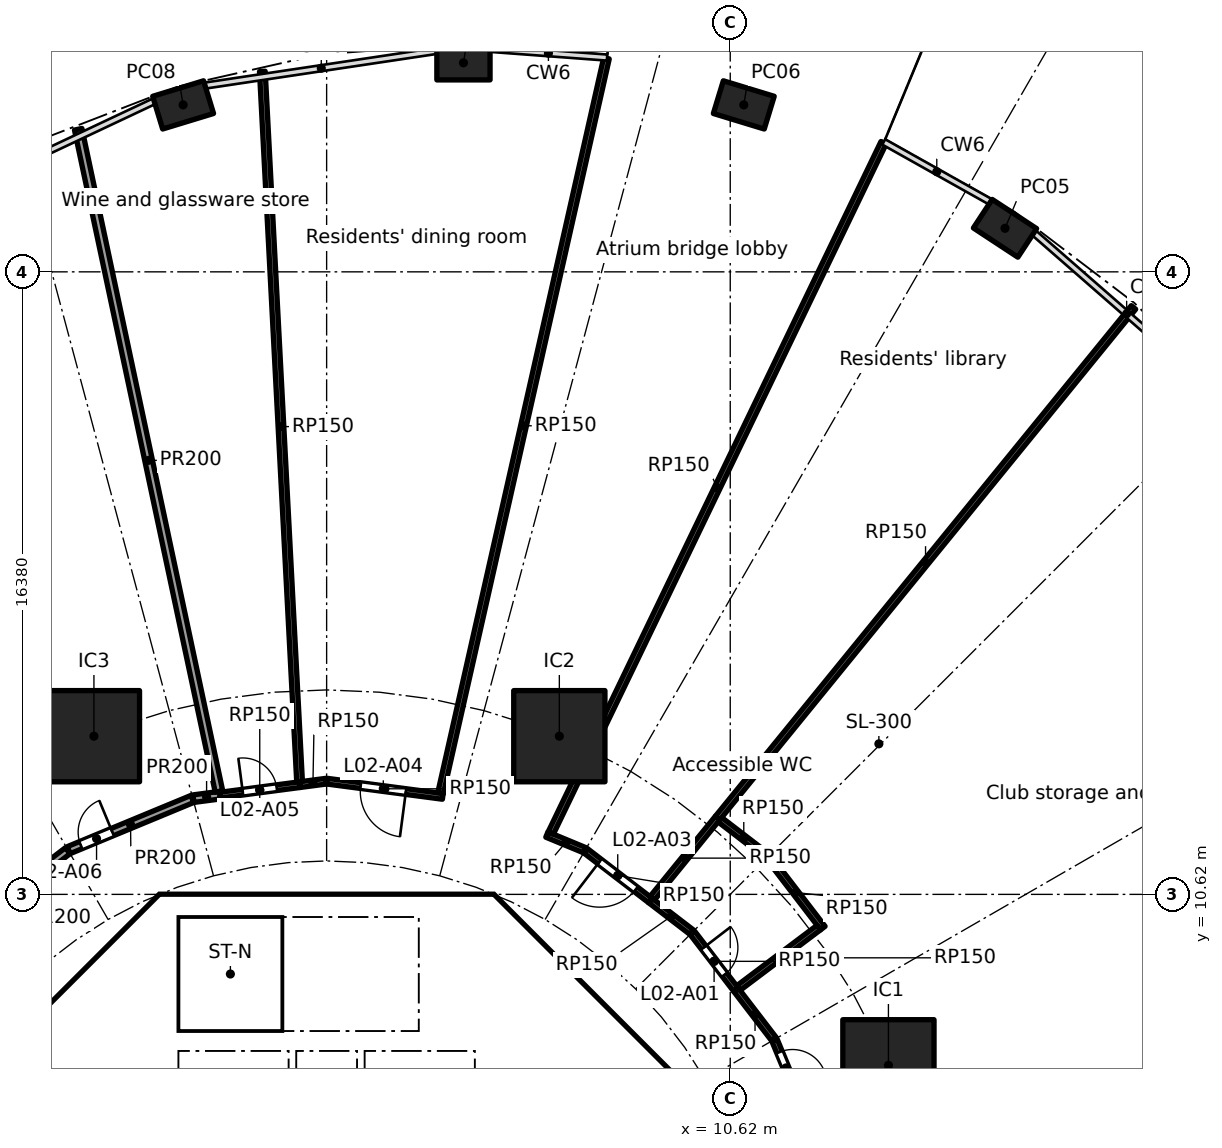
"""IFC4 building model, lengths in metres.
Left out: names, types, materials, properties, quantities, classifications, styles, units other than length and angle.
Written with IfcOpenShell. Run it as: python <this file> out.ifc"""

import sys

from ifc_helpers import new_model, si_unit, direction, frame, frame_2d, origin, origin_2d, place, context, subcontext, project, spatial, polyline, rectangle, hollow_rectangle, outline, extrude, element, fill, save


model = new_model("IFC4")
c1 = context("Model", 3, precision=1e-05, world=origin(), true_north=direction((0.0, 1.0)))
c2 = subcontext(c1, "Body", "Model", "MODEL_VIEW")
j1 = project(units=[si_unit("LENGTHUNIT", "METRE"), si_unit("PLANEANGLEUNIT", "RADIAN")], contexts=[c1])
p1 = place(None, origin())
s1 = spatial("IfcSite", under=j1, at=p1, CompositionType="ELEMENT")
p2 = place(p1, origin())
s2 = spatial("IfcBuilding", under=s1, at=p2, CompositionType="ELEMENT")
p3 = place(p2, frame((0.0, 0.0, 12.0)))
s3 = spatial("IfcBuildingStorey", under=s2, at=p3, CompositionType="ELEMENT", Elevation=12.0)
for number, where, z_axis, x_axis in (
    (1, (17.85, 28.146, 0.0), (0.0, 0.0, 1.0), (-0.836, 0.549, 0.0)),
    (2, (10.976, 31.393, 0.0), (0.0, 0.0, 1.0), (-0.957, 0.292, 0.0)),
    (3, (3.6, 32.5, 0.0), (0.0, 0.0, 1.0), (-1.0, 0.0, 0.0)),
    (4, (-3.776, 31.393, 0.0), (0.0, 0.0, 1.0), (-0.957, -0.292, 0.0)),
):
    element("IfcColumn", number, at=place(p3, frame(where, z_axis=z_axis, x_axis=x_axis)), inside=s3, PredefinedType="COLUMN", context=c2, shape_type="SweptSolid", body=[
        extrude(hollow_rectangle(XDim=1.4, YDim=0.9, WallThickness=0.05, at=origin_2d()), origin(), (0.0, 0.0, 1.0), 5.0),
    ])
for number, where, z_axis, x_axis in (
    (5, (14.782, 6.123, 0.0), (0.0, 0.0, 1.0), (1.0, 0.0, 0.0)),
    (6, (6.123, 14.782, 0.0), (0.0, 0.0, 1.0), (1.0, 0.0, 0.0)),
    (7, (-6.123, 14.782, 0.0), (0.0, 0.0, 1.0), (1.0, 0.0, 0.0)),
):
    element("IfcColumn", number, at=place(p3, frame(where, z_axis=z_axis, x_axis=x_axis)), inside=s3, PredefinedType="COLUMN", context=c2, shape_type="SweptSolid", body=[
        extrude(rectangle(XDim=2.4, YDim=2.4, at=origin_2d()), origin(), (0.0, 0.0, 1.0), 5.0),
    ])
p4 = place(p3, frame((9.988, 4.613, 0.0), z_axis=(0.0, 0.0, 1.0), x_axis=(-0.707106781187, 0.707106781187, 0.0)))
e8 = element("IfcWall", 8, at=p4, inside=s3, PredefinedType="SHEAR", context=c2, shape_type="SweptSolid", body=[
    extrude(rectangle(XDim=7.602, YDim=0.6, at=frame_2d((3.801, 0.0))), origin(), (0.0, 0.0, 1.0), 4.7),
])
p5 = place(p4, frame((3.201, 0.0, 0.0)))
e9 = element("IfcOpeningElement", 9, at=p5, cuts=e8, PredefinedType="OPENING", context=c2, shape_type="SweptSolid", body=[
    extrude(rectangle(XDim=1.2, YDim=2.1, at=frame_2d((0.6, 1.05))), frame((0.0, 0.31, 0.0), z_axis=(0.0, -1.0, 0.0), x_axis=(1.0, 0.0, 0.0)), (0.0, 0.0, 1.0), 0.62),
])
p6 = place(p3, frame((-4.613, 9.988, 0.0), z_axis=(0.0, 0.0, 1.0), x_axis=(-0.707106781187, -0.707106781187, 0.0)))
e10 = element("IfcWall", 10, at=p6, inside=s3, PredefinedType="SHEAR", context=c2, shape_type="SweptSolid", body=[
    extrude(rectangle(XDim=7.602, YDim=0.6, at=frame_2d((3.801, 0.0))), origin(), (0.0, 0.0, 1.0), 4.7),
])
p7 = place(p6, frame((0.351, 0.0, 0.0)))
e11 = element("IfcOpeningElement", 11, at=p7, cuts=e10, PredefinedType="OPENING", context=c2, shape_type="SweptSolid", body=[
    extrude(rectangle(XDim=1.1, YDim=2.1, at=frame_2d((0.55, 1.05))), frame((0.0, 0.31, 0.0), z_axis=(0.0, -1.0, 0.0), x_axis=(1.0, 0.0, 0.0)), (0.0, 0.0, 1.0), 0.62),
])
p8 = place(p3, frame((-5.8, 4.3, 0.0), z_axis=(0.0, 0.0, 1.0), x_axis=(0.0, 1.0, 0.0)))
e12 = element("IfcWall", 12, at=p8, inside=s3, PredefinedType="PARTITIONING", context=c2, shape_type="SweptSolid", body=[
    extrude(rectangle(XDim=3.927, YDim=0.15, at=frame_2d((1.963, 0.0))), origin(), (0.0, 0.0, 1.0), 4.7),
])
p9 = place(p8, frame((1.551, 0.0, 0.0)))
e13 = element("IfcOpeningElement", 13, at=p9, cuts=e12, PredefinedType="OPENING", context=c2, shape_type="SweptSolid", body=[
    extrude(rectangle(XDim=0.9, YDim=2.1, at=frame_2d((0.45, 1.05))), frame((0.0, 0.085, 0.0), z_axis=(0.0, -1.0, 0.0), x_axis=(1.0, 0.0, 0.0)), (0.0, 0.0, 1.0), 0.17),
])
p10 = place(p3, frame((4.0, 4.3, 0.0), z_axis=(0.0, 0.0, 1.0), x_axis=(0.0, 1.0, 0.0)))
e14 = element("IfcWall", 14, at=p10, inside=s3, PredefinedType="SOLIDWALL", context=c2, shape_type="SweptSolid", body=[
    extrude(rectangle(XDim=2.2, YDim=0.2, at=frame_2d((1.1, 0.0))), origin(), (0.0, 0.0, 1.0), 4.7),
])
p11 = place(p10, frame((0.55, 0.0, 0.0)))
e15 = element("IfcOpeningElement", 15, at=p11, cuts=e14, PredefinedType="OPENING", context=c2, shape_type="SweptSolid", body=[
    extrude(rectangle(XDim=1.1, YDim=2.1, at=frame_2d((0.55, 1.05))), frame((0.0, 0.11, 0.0), z_axis=(0.0, -1.0, 0.0), x_axis=(1.0, 0.0, 0.0)), (0.0, 0.0, 1.0), 0.22),
])
p12 = place(p3, frame((-4.0, 4.3, 0.0), z_axis=(0.0, 0.0, 1.0), x_axis=(0.0, 1.0, 0.0)))
e16 = element("IfcWall", 16, at=p12, inside=s3, PredefinedType="SOLIDWALL", context=c2, shape_type="SweptSolid", body=[
    extrude(rectangle(XDim=2.2, YDim=0.2, at=frame_2d((1.1, 0.0))), origin(), (0.0, 0.0, 1.0), 4.7),
])
p13 = place(p12, frame((0.55, 0.0, 0.0)))
e17 = element("IfcOpeningElement", 17, at=p13, cuts=e16, PredefinedType="OPENING", context=c2, shape_type="SweptSolid", body=[
    extrude(rectangle(XDim=1.1, YDim=2.1, at=frame_2d((0.55, 1.05))), frame((0.0, 0.11, 0.0), z_axis=(0.0, -1.0, 0.0), x_axis=(1.0, 0.0, 0.0)), (0.0, 0.0, 1.0), 0.22),
])
p14 = place(p3, frame((4.0, 7.025, 0.0), z_axis=(0.0, 0.0, 1.0), x_axis=(0.0, 1.0, 0.0)))
e18 = element("IfcWall", 18, at=p14, inside=s3, PredefinedType="SOLIDWALL", context=c2, shape_type="SweptSolid", body=[
    extrude(rectangle(XDim=3.0, YDim=0.2, at=frame_2d((1.5, 0.0))), origin(), (0.0, 0.0, 1.0), 4.7),
])
p15 = place(p14, frame((0.925, 0.0, 0.0)))
e19 = element("IfcOpeningElement", 19, at=p15, cuts=e18, PredefinedType="OPENING", context=c2, shape_type="SweptSolid", body=[
    extrude(rectangle(XDim=1.1, YDim=2.1, at=frame_2d((0.55, 1.05))), frame((0.0, 0.11, 0.0), z_axis=(0.0, -1.0, 0.0), x_axis=(1.0, 0.0, 0.0)), (0.0, 0.0, 1.0), 0.22),
])
p16 = place(p3, origin())
e20 = element("IfcWall", 20, at=p16, inside=s3, PredefinedType="SHEAR", context=c2, shape_type="SweptSolid", body=[
    extrude(outline(polyline([(-4.152, 10.025), (-4.401, 9.776), (-4.825, 10.2), (-4.401, 10.625), (4.401, 10.625), (4.825, 10.2), (4.401, 9.776), (4.152, 10.025), (-4.152, 10.025)])), origin(), (0.0, 0.0, 1.0), 4.7),
])
for number, where, z_axis, x_axis in (
    (21, (-0.9, 4.3, 0.0), (0.0, 0.0, 1.0), (0.0, 1.0, 0.0)),
    (22, (0.9, 4.3, 0.0), (0.0, 0.0, 1.0), (0.0, 1.0, 0.0)),
):
    element("IfcWall", number, at=place(p3, frame(where, z_axis=z_axis, x_axis=x_axis)), inside=s3, PredefinedType="SOLIDWALL", context=c2, shape_type="SweptSolid", body=[
        extrude(rectangle(XDim=2.2, YDim=0.2, at=frame_2d((1.1, 0.0))), origin(), (0.0, 0.0, 1.0), 4.7),
    ])
p17 = place(p3, origin())
e23 = element("IfcWall", 23, at=p17, inside=s3, PredefinedType="SOLIDWALL", context=c2, shape_type="SweptSolid", body=[
    extrude(outline(polyline([(-3.9, 7.025), (-4.1, 7.025), (-4.1, 10.025), (-3.9, 10.025), (-3.9, 7.025)])), origin(), (0.0, 0.0, 1.0), 4.7),
])
p18 = place(p3, origin())
e24 = element("IfcWall", 24, at=p18, inside=s3, PredefinedType="SOLIDWALL", context=c2, shape_type="SweptSolid", body=[
    extrude(outline(polyline([(4.1, 6.5), (-4.1, 6.5), (-4.1, 7.025), (4.1, 7.025), (4.1, 6.5)])), origin(), (0.0, 0.0, 1.0), 4.7),
])
p19 = place(p3, frame((-2.812, 13.23, 0.0), z_axis=(0.0, 0.0, 1.0), x_axis=(0.991438625664, 0.130573548402, 0.0)))
e25 = element("IfcWall", 25, at=p19, inside=s3, PredefinedType="PARTITIONING", context=c2, shape_type="SweptSolid", body=[
    extrude(rectangle(XDim=2.122, YDim=0.15, at=frame_2d((1.061, 0.0))), origin(), (0.0, 0.0, 1.0), 4.7),
])
p20 = place(p19, frame((0.611, 0.0, 0.0)))
e26 = element("IfcOpeningElement", 26, at=p20, cuts=e25, PredefinedType="OPENING", context=c2, shape_type="SweptSolid", body=[
    extrude(rectangle(XDim=0.9, YDim=2.1, at=frame_2d((0.45, 1.05))), frame((0.0, 0.085, 0.0), z_axis=(0.0, -1.0, 0.0), x_axis=(1.0, 0.0, 0.0)), (0.0, 0.0, 1.0), 0.17),
])
p21 = place(p3, frame((-0.712, 13.582, 0.0), z_axis=(0.0, 0.0, 1.0), x_axis=(-0.052329494039, 0.998629873403, 0.0)))
e27 = element("IfcWall", 27, at=p21, inside=s3, PredefinedType="PARTITIONING", context=c2, shape_type="SweptSolid", body=[
    extrude(rectangle(XDim=18.718, YDim=0.15, at=frame_2d((9.359, 0.0))), origin(), (0.0, 0.0, 1.0), 4.7),
])
p22 = place(p3, frame((-0.708, 13.507, 0.0), z_axis=(0.0, 0.0, 1.0), x_axis=(0.991466123966, 0.130364585024, 0.0)))
e28 = element("IfcWall", 28, at=p22, inside=s3, PredefinedType="PARTITIONING", context=c2, shape_type="SweptSolid", body=[
    extrude(rectangle(XDim=0.702, YDim=0.15, at=frame_2d((0.351, 0.0))), origin(), (0.0, 0.0, 1.0), 4.7),
])
p23 = place(p3, frame((0.012, 13.598, 0.0), z_axis=(0.0, 0.0, 1.0), x_axis=(0.991450776896, -0.130481251495, 0.0)))
e29 = element("IfcWall", 29, at=p23, inside=s3, PredefinedType="PARTITIONING", context=c2, shape_type="SweptSolid", body=[
    extrude(rectangle(XDim=3.071, YDim=0.15, at=frame_2d((1.535, 0.0))), origin(), (0.0, 0.0, 1.0), 4.7),
])
p24 = place(p23, frame((0.892, 0.0, 0.0)))
e30 = element("IfcOpeningElement", 30, at=p24, cuts=e29, PredefinedType="OPENING", context=c2, shape_type="SweptSolid", body=[
    extrude(rectangle(XDim=1.2, YDim=2.1, at=frame_2d((0.6, 1.05))), frame((0.0, 0.085, 0.0), z_axis=(0.0, -1.0, 0.0), x_axis=(1.0, 0.0, 0.0)), (0.0, 0.0, 1.0), 0.17),
])
p25 = place(p3, frame((2.998, 13.281, 0.0), z_axis=(0.0, 0.0, 1.0), x_axis=(0.220191699756, 0.975456618901, 0.0)))
e31 = element("IfcWall", 31, at=p25, inside=s3, PredefinedType="PARTITIONING", context=c2, shape_type="SweptSolid", body=[
    extrude(rectangle(XDim=19.825, YDim=0.15, at=frame_2d((9.912, 0.0))), origin(), (0.0, 0.0, 1.0), 4.7),
])
p26 = place(p3, frame((5.795, 12.194, 0.0), z_axis=(0.0, 0.0, 1.0), x_axis=(0.923867429555, -0.382712650179, 0.0)))
e32 = element("IfcWall", 32, at=p26, inside=s3, PredefinedType="PARTITIONING", context=c2, shape_type="SweptSolid", body=[
    extrude(rectangle(XDim=1.075, YDim=0.15, at=frame_2d((0.538, 0.0))), origin(), (0.0, 0.0, 1.0), 4.7),
])
p27 = place(p3, frame((6.809, 11.771, 0.0), z_axis=(0.0, 0.0, 1.0), x_axis=(0.793372937326, -0.608735888805, 0.0)))
e33 = element("IfcWall", 33, at=p27, inside=s3, PredefinedType="PARTITIONING", context=c2, shape_type="SweptSolid", body=[
    extrude(rectangle(XDim=2.155, YDim=0.15, at=frame_2d((1.078, 0.0))), origin(), (0.0, 0.0, 1.0), 4.7),
])
p28 = place(p27, frame((0.472, 0.0, 0.0)))
e34 = element("IfcOpeningElement", 34, at=p28, cuts=e33, PredefinedType="OPENING", context=c2, shape_type="SweptSolid", body=[
    extrude(rectangle(XDim=1.2, YDim=2.1, at=frame_2d((0.6, 1.05))), frame((0.0, 0.085, 0.0), z_axis=(0.0, -1.0, 0.0), x_axis=(1.0, 0.0, 0.0)), (0.0, 0.0, 1.0), 0.17),
])
p29 = place(p3, frame((8.519, 10.459, 0.0), z_axis=(0.0, 0.0, 1.0), x_axis=(0.793371316762, -0.6087380009, 0.0)))
e35 = element("IfcWall", 35, at=p29, inside=s3, PredefinedType="PARTITIONING", context=c2, shape_type="SweptSolid", body=[
    extrude(rectangle(XDim=1.371, YDim=0.15, at=frame_2d((0.686, 0.0))), origin(), (0.0, 0.0, 1.0), 4.7),
])
p30 = place(p3, frame((8.567, 10.517, 0.0), z_axis=(0.0, 0.0, 1.0), x_axis=(0.631573271363, 0.775316195432, 0.0)))
e36 = element("IfcWall", 36, at=p30, inside=s3, PredefinedType="PARTITIONING", context=c2, shape_type="SweptSolid", body=[
    extrude(rectangle(XDim=2.726, YDim=0.15, at=frame_2d((1.363, 0.0))), origin(), (0.0, 0.0, 1.0), 4.7),
])
p31 = place(p3, frame((9.624, 9.607, 0.0), z_axis=(0.0, 0.0, 1.0), x_axis=(0.608754453805, -0.793358692504, 0.0)))
e37 = element("IfcWall", 37, at=p31, inside=s3, PredefinedType="PARTITIONING", context=c2, shape_type="SweptSolid", body=[
    extrude(rectangle(XDim=1.888, YDim=0.15, at=frame_2d((0.944, 0.0))), origin(), (0.0, 0.0, 1.0), 4.7),
])
p32 = place(p31, frame((0.488, 0.0, 0.0)))
e38 = element("IfcOpeningElement", 38, at=p32, cuts=e37, PredefinedType="OPENING", context=c2, shape_type="SweptSolid", body=[
    extrude(rectangle(XDim=0.9, YDim=2.1, at=frame_2d((0.45, 1.05))), frame((0.0, 0.085, 0.0), z_axis=(0.0, -1.0, 0.0), x_axis=(1.0, 0.0, 0.0)), (0.0, 0.0, 1.0), 0.17),
])
p33 = place(p3, frame((10.348, 12.585, 0.0), z_axis=(0.0, 0.0, 1.0), x_axis=(0.793328373205, -0.608793965368, 0.0)))
e39 = element("IfcWall", 39, at=p33, inside=s3, PredefinedType="PARTITIONING", context=c2, shape_type="SweptSolid", body=[
    extrude(rectangle(XDim=1.584, YDim=0.15, at=frame_2d((0.792, 0.0))), origin(), (0.0, 0.0, 1.0), 4.7),
])
p34 = place(p3, frame((10.288, 12.631, 0.0), z_axis=(0.0, 0.0, 1.0), x_axis=(0.631546535922, 0.77533797338, 0.0)))
e40 = element("IfcWall", 40, at=p34, inside=s3, PredefinedType="PARTITIONING", context=c2, shape_type="SweptSolid", body=[
    extrude(rectangle(XDim=17.325, YDim=0.15, at=frame_2d((8.663, 0.0))), origin(), (0.0, 0.0, 1.0), 4.7),
])
p35 = place(p3, frame((10.774, 8.109, 0.0), z_axis=(0.0, 0.0, 1.0), x_axis=(0.608716251771, -0.793388003961, 0.0)))
e41 = element("IfcWall", 41, at=p35, inside=s3, PredefinedType="PARTITIONING", context=c2, shape_type="SweptSolid", body=[
    extrude(rectangle(XDim=1.638, YDim=0.15, at=frame_2d((0.819, 0.0))), origin(), (0.0, 0.0, 1.0), 4.7),
])
p36 = place(p3, frame((11.621, 11.604, 0.0), z_axis=(0.0, 0.0, 1.0), x_axis=(0.608759688573, -0.793354675771, 0.0)))
e42 = element("IfcWall", 42, at=p36, inside=s3, PredefinedType="PARTITIONING", context=c2, shape_type="SweptSolid", body=[
    extrude(rectangle(XDim=2.358, YDim=0.15, at=frame_2d((1.179, 0.0))), origin(), (0.0, 0.0, 1.0), 4.7),
])
p37 = place(p3, frame((11.782, 6.789, 0.0), z_axis=(0.0, 0.0, 1.0), x_axis=(0.382677866108, -0.923881838111, 0.0)))
e43 = element("IfcWall", 43, at=p37, inside=s3, PredefinedType="PARTITIONING", context=c2, shape_type="SweptSolid", body=[
    extrude(rectangle(XDim=3.527, YDim=0.15, at=frame_2d((1.763, 0.0))), origin(), (0.0, 0.0, 1.0), 4.7),
])
p38 = place(p37, frame((0.346, 0.0, 0.0)))
e44 = element("IfcOpeningElement", 44, at=p38, cuts=e43, PredefinedType="OPENING", context=c2, shape_type="SweptSolid", body=[
    extrude(rectangle(XDim=0.9, YDim=2.1, at=frame_2d((0.45, 1.05))), frame((0.0, 0.085, 0.0), z_axis=(0.0, -1.0, 0.0), x_axis=(1.0, 0.0, 0.0)), (0.0, 0.0, 1.0), 0.17),
])
p39 = place(p3, frame((12.951, 9.748, 0.0), z_axis=(0.0, 0.0, 1.0), x_axis=(-0.798970748419, -0.601369888813, 0.0)))
e45 = element("IfcWall", 45, at=p39, inside=s3, PredefinedType="PARTITIONING", context=c2, shape_type="SweptSolid", body=[
    extrude(rectangle(XDim=2.65, YDim=0.15, at=frame_2d((1.325, 0.0))), origin(), (0.0, 0.0, 1.0), 4.7),
])
p40 = place(p3, frame((14.654, 30.398, 0.0), z_axis=(0.0, 0.0, 1.0), x_axis=(-0.434261119912, -0.900787033506, 0.0)))
e46 = element("IfcWall", 46, at=p40, inside=s3, PredefinedType="PARTITIONING", context=c2, shape_type="SweptSolid", body=[
    extrude(rectangle(XDim=20.166, YDim=0.15, at=frame_2d((10.083, 0.0))), origin(), (0.0, 0.0, 1.0), 4.7),
])
p41 = place(p3, frame((-9.05, 10.051, 0.0), z_axis=(0.0, 0.0, 1.0), x_axis=(0.793389024662, 0.608714921409, 0.0)))
e47 = element("IfcWall", 47, at=p41, inside=s3, PredefinedType="PARTITIONING", context=c2, shape_type="SweptSolid", body=[
    extrude(rectangle(XDim=2.821, YDim=0.2, at=frame_2d((1.411, 0.0))), origin(), (0.0, 0.0, 1.0), 4.7),
])
p42 = place(p3, frame((-6.786, 11.784, 0.0), z_axis=(0.0, 0.0, 1.0), x_axis=(0.92386297064, 0.382723413813, 0.0)))
e48 = element("IfcWall", 48, at=p42, inside=s3, PredefinedType="PARTITIONING", context=c2, shape_type="SweptSolid", body=[
    extrude(rectangle(XDim=3.52, YDim=0.2, at=frame_2d((1.76, 0.0))), origin(), (0.0, 0.0, 1.0), 4.7),
])
p43 = place(p42, frame((0.342, 0.0, 0.0)))
e49 = element("IfcOpeningElement", 49, at=p43, cuts=e48, PredefinedType="OPENING", context=c2, shape_type="SweptSolid", body=[
    extrude(rectangle(XDim=0.9, YDim=2.1, at=frame_2d((0.45, 1.05))), frame((0.0, 0.11, 0.0), z_axis=(0.0, -1.0, 0.0), x_axis=(1.0, 0.0, 0.0)), (0.0, 0.0, 1.0), 0.22),
])
p44 = place(p3, frame((-3.505, 13.139, 0.0), z_axis=(0.0, 0.0, 1.0), x_axis=(0.991473310532, 0.130309917135, 0.0)))
e50 = element("IfcWall", 50, at=p44, inside=s3, PredefinedType="PARTITIONING", context=c2, shape_type="SweptSolid", body=[
    extrude(rectangle(XDim=0.699, YDim=0.2, at=frame_2d((0.349, 0.0))), origin(), (0.0, 0.0, 1.0), 4.7),
])
p45 = place(p3, frame((-2.833, 13.328, 0.0), z_axis=(0.0, 0.0, 1.0), x_axis=(-0.207909569071, 0.978148051722, 0.0)))
e51 = element("IfcWall", 51, at=p45, inside=s3, PredefinedType="PARTITIONING", context=c2, shape_type="SweptSolid", body=[
    extrude(rectangle(XDim=17.813, YDim=0.2, at=frame_2d((8.907, 0.0))), origin(), (0.0, 0.0, 1.0), 4.7),
])
p46 = place(p15, origin())
e52 = element("IfcDoor", 52, at=p46, inside=s3, OperationType="SINGLE_SWING_RIGHT", PredefinedType="DOOR", context=c2, shape_type="SweptSolid", body=[
    extrude(rectangle(XDim=1.1, YDim=2.1, at=frame_2d((0.55, 1.05))), frame((0.0, 0.025, 0.0), z_axis=(0.0, -1.0, 0.0), x_axis=(1.0, 0.0, 0.0)), (0.0, 0.0, 1.0), 0.05),
])
fill(e19, e52)
p47 = place(p9, origin())
e53 = element("IfcDoor", 53, at=p47, inside=s3, OperationType="SINGLE_SWING_LEFT", PredefinedType="DOOR", context=c2, shape_type="SweptSolid", body=[
    extrude(rectangle(XDim=0.9, YDim=2.1, at=frame_2d((0.45, 1.05))), frame((0.0, 0.025, 0.0), z_axis=(0.0, -1.0, 0.0), x_axis=(1.0, 0.0, 0.0)), (0.0, 0.0, 1.0), 0.05),
])
fill(e13, e53)
p48 = place(p5, origin())
e54 = element("IfcDoor", 54, at=p48, inside=s3, OperationType="SINGLE_SWING_RIGHT", PredefinedType="DOOR", context=c2, shape_type="SweptSolid", body=[
    extrude(rectangle(XDim=1.2, YDim=2.1, at=frame_2d((0.6, 1.05))), frame((0.0, 0.025, 0.0), z_axis=(0.0, -1.0, 0.0), x_axis=(1.0, 0.0, 0.0)), (0.0, 0.0, 1.0), 0.05),
])
fill(e9, e54)
p49 = place(p7, origin())
e55 = element("IfcDoor", 55, at=p49, inside=s3, OperationType="SINGLE_SWING_RIGHT", PredefinedType="DOOR", context=c2, shape_type="SweptSolid", body=[
    extrude(rectangle(XDim=1.1, YDim=2.1, at=frame_2d((0.55, 1.05))), frame((0.0, 0.025, 0.0), z_axis=(0.0, -1.0, 0.0), x_axis=(1.0, 0.0, 0.0)), (0.0, 0.0, 1.0), 0.05),
])
fill(e11, e55)
p50 = place(p32, origin())
e56 = element("IfcDoor", 56, at=p50, inside=s3, OperationType="SINGLE_SWING_LEFT", PredefinedType="DOOR", context=c2, shape_type="SweptSolid", body=[
    extrude(rectangle(XDim=0.9, YDim=2.1, at=frame_2d((0.45, 1.05))), frame((0.0, 0.025, 0.0), z_axis=(0.0, -1.0, 0.0), x_axis=(1.0, 0.0, 0.0)), (0.0, 0.0, 1.0), 0.05),
])
fill(e38, e56)
p51 = place(p38, origin())
e57 = element("IfcDoor", 57, at=p51, inside=s3, OperationType="SINGLE_SWING_RIGHT", PredefinedType="DOOR", context=c2, shape_type="SweptSolid", body=[
    extrude(rectangle(XDim=0.9, YDim=2.1, at=frame_2d((0.45, 1.05))), frame((0.0, 0.025, 0.0), z_axis=(0.0, -1.0, 0.0), x_axis=(1.0, 0.0, 0.0)), (0.0, 0.0, 1.0), 0.05),
])
fill(e44, e57)
p52 = place(p28, frame((1.2, 0.0, 0.0), x_axis=(-1.0, 0.0, 0.0)))
e58 = element("IfcDoor", 58, at=p52, inside=s3, OperationType="SINGLE_SWING_RIGHT", PredefinedType="DOOR", context=c2, shape_type="SweptSolid", body=[
    extrude(rectangle(XDim=1.2, YDim=2.1, at=frame_2d((0.6, 1.05))), frame((0.0, 0.025, 0.0), z_axis=(0.0, -1.0, 0.0), x_axis=(1.0, 0.0, 0.0)), (0.0, 0.0, 1.0), 0.05),
])
fill(e34, e58)
p53 = place(p24, frame((1.2, 0.0, 0.0), x_axis=(-1.0, 0.0, 0.0)))
e59 = element("IfcDoor", 59, at=p53, inside=s3, OperationType="SINGLE_SWING_LEFT", PredefinedType="DOOR", context=c2, shape_type="SweptSolid", body=[
    extrude(rectangle(XDim=1.2, YDim=2.1, at=frame_2d((0.6, 1.05))), frame((0.0, 0.025, 0.0), z_axis=(0.0, -1.0, 0.0), x_axis=(1.0, 0.0, 0.0)), (0.0, 0.0, 1.0), 0.05),
])
fill(e30, e59)
p54 = place(p20, origin())
e60 = element("IfcDoor", 60, at=p54, inside=s3, OperationType="SINGLE_SWING_LEFT", PredefinedType="DOOR", context=c2, shape_type="SweptSolid", body=[
    extrude(rectangle(XDim=0.9, YDim=2.1, at=frame_2d((0.45, 1.05))), frame((0.0, 0.025, 0.0), z_axis=(0.0, -1.0, 0.0), x_axis=(1.0, 0.0, 0.0)), (0.0, 0.0, 1.0), 0.05),
])
fill(e26, e60)
p55 = place(p43, origin())
e61 = element("IfcDoor", 61, at=p55, inside=s3, OperationType="SINGLE_SWING_RIGHT", PredefinedType="DOOR", context=c2, shape_type="SweptSolid", body=[
    extrude(rectangle(XDim=0.9, YDim=2.1, at=frame_2d((0.45, 1.05))), frame((0.0, 0.025, 0.0), z_axis=(0.0, -1.0, 0.0), x_axis=(1.0, 0.0, 0.0)), (0.0, 0.0, 1.0), 0.05),
])
fill(e49, e61)
save(model, sys.argv[1])
